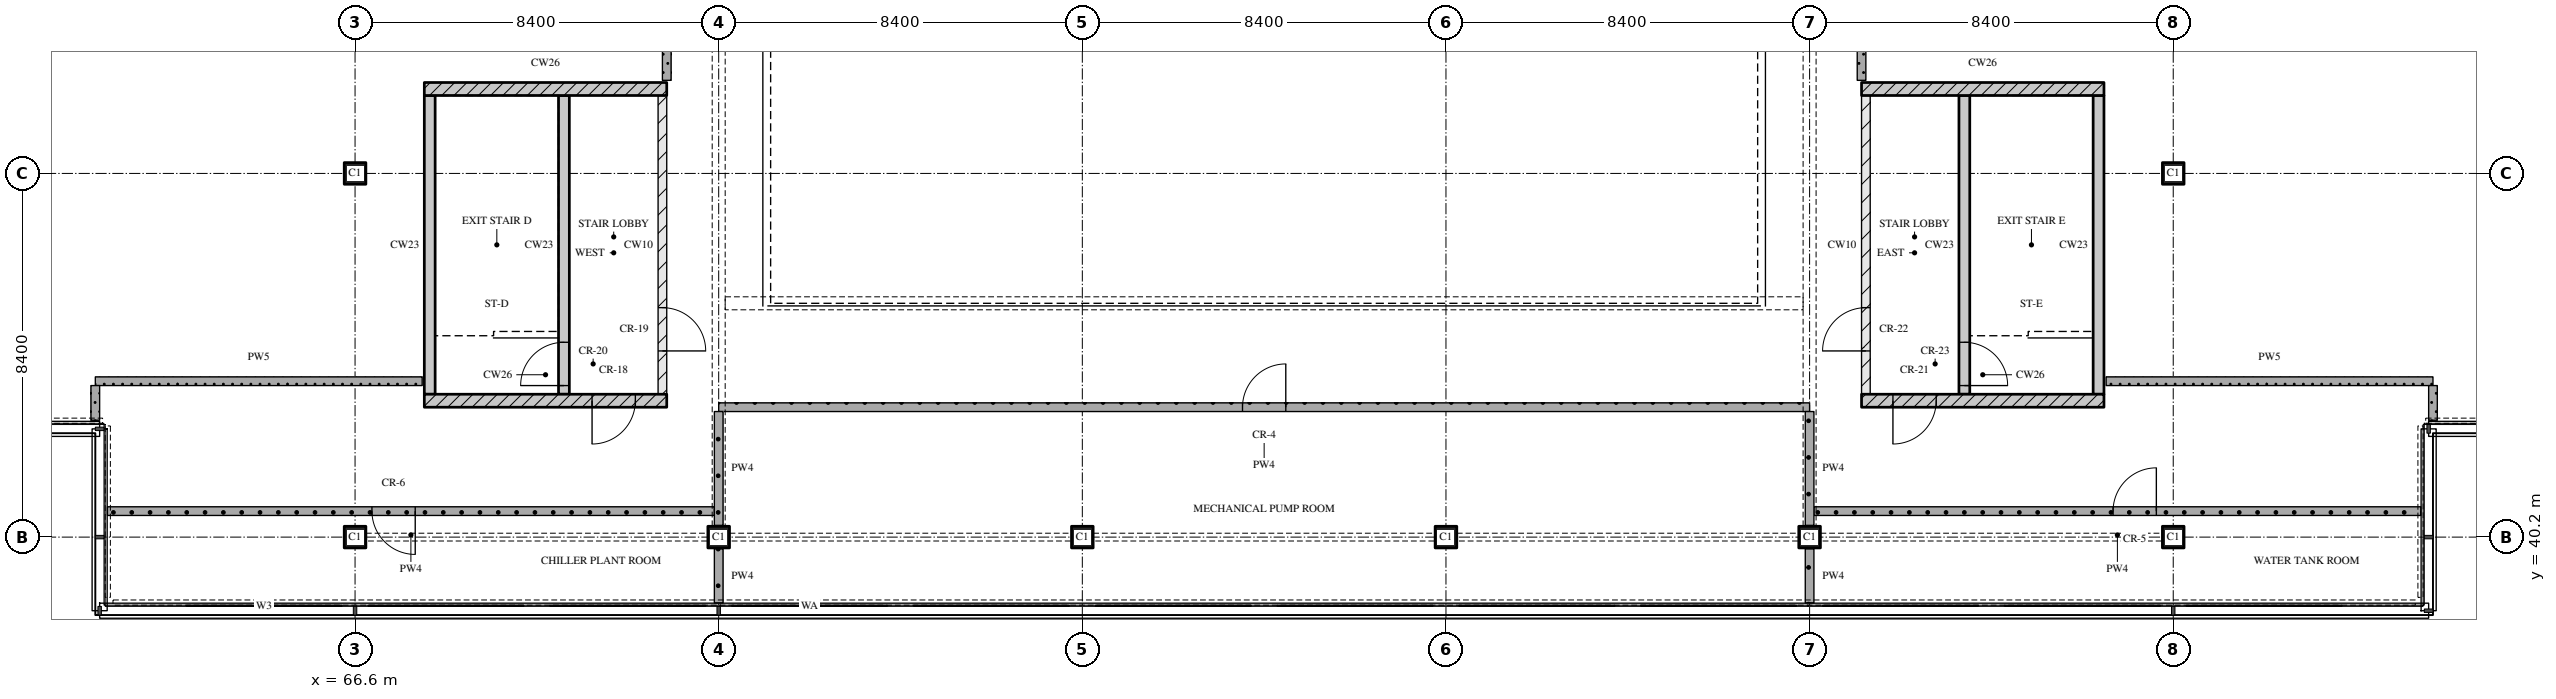
"""IFC4 building model, lengths in metres.
Left out: names, types, materials, properties, quantities, classifications, styles, units other than length and angle.
Written with IfcOpenShell. Run it as: python <this file> out.ifc"""

import sys

from ifc_helpers import new_model, si_unit, direction, frame, frame_2d, origin, origin_2d, place, context, subcontext, project, spatial, rectangle, extrude, element, fill, save


model = new_model("IFC4")
c1 = context("Model", 3, precision=1e-05, world=origin(), true_north=direction((0.0, 1.0)))
c2 = subcontext(c1, "Body", "Model", "MODEL_VIEW")
j1 = project(units=[si_unit("LENGTHUNIT", "METRE"), si_unit("PLANEANGLEUNIT", "RADIAN")], contexts=[c1])
p1 = place(None, origin())
s1 = spatial("IfcSite", under=j1, at=p1, CompositionType="ELEMENT")
p2 = place(p1, origin())
s2 = spatial("IfcBuilding", under=s1, at=p2, CompositionType="ELEMENT")
p3 = place(p2, frame((0.0, 0.0, 310.35)))
s3 = spatial("IfcBuildingStorey", under=s2, at=p3, CompositionType="ELEMENT", Elevation=310.35)
for number, where, z_axis, x_axis in (
    (1, (66.6, 40.2, 0.0), (0.0, 0.0, 1.0), (1.0, 0.0, 0.0)),
    (2, (66.6, 48.6, 0.0), (0.0, 0.0, 1.0), (1.0, 0.0, 0.0)),
    (3, (75.0, 40.2, 0.0), (0.0, 0.0, 1.0), (1.0, 0.0, 0.0)),
    (4, (83.4, 40.2, 0.0), (0.0, 0.0, 1.0), (1.0, 0.0, 0.0)),
    (5, (91.8, 40.2, 0.0), (0.0, 0.0, 1.0), (1.0, 0.0, 0.0)),
    (6, (100.2, 40.2, 0.0), (0.0, 0.0, 1.0), (1.0, 0.0, 0.0)),
    (7, (108.6, 40.2, 0.0), (0.0, 0.0, 1.0), (1.0, 0.0, 0.0)),
    (8, (108.6, 48.6, 0.0), (0.0, 0.0, 1.0), (1.0, 0.0, 0.0)),
):
    element("IfcColumn", number, at=place(p3, frame(where, z_axis=z_axis, x_axis=x_axis)), inside=s3, PredefinedType="COLUMN", context=c2, shape_type="SweptSolid", body=[
        extrude(rectangle(XDim=0.5, YDim=0.5, at=origin_2d()), origin(), (0.0, 0.0, 1.0), 4.5),
    ])
p4 = place(p3, frame((68.2, 43.35, 0.0), z_axis=(0.0, 0.0, 1.0), x_axis=(1.0, 0.0, 0.0)))
e9 = element("IfcWall", 9, at=p4, inside=s3, PredefinedType="SOLIDWALL", context=c2, shape_type="SweptSolid", body=[
    extrude(rectangle(XDim=5.6, YDim=0.3, at=frame_2d((2.8, 0.0))), origin(), (0.0, 0.0, 1.0), 4.2),
])
p5 = place(p4, frame((3.875, 0.0, 0.0)))
e10 = element("IfcOpeningElement", 10, at=p5, cuts=e9, PredefinedType="OPENING", context=c2, shape_type="SweptSolid", body=[
    extrude(rectangle(XDim=1.0, YDim=2.1, at=frame_2d((0.5, 1.05))), frame((0.0, 0.16, 0.0), z_axis=(0.0, -1.0, 0.0), x_axis=(1.0, 0.0, 0.0)), (0.0, 0.0, 1.0), 0.32),
])
p6 = place(p3, frame((68.325, 43.5, 0.0), z_axis=(0.0, 0.0, 1.0), x_axis=(0.0, 1.0, 0.0)))
e11 = element("IfcWall", 11, at=p6, inside=s3, PredefinedType="SOLIDWALL", context=c2, shape_type="SweptSolid", body=[
    extrude(rectangle(XDim=6.9, YDim=0.25, at=frame_2d((3.45, 0.0))), origin(), (0.0, 0.0, 1.0), 4.2),
])
p7 = place(p3, frame((71.425, 43.5, 0.0), z_axis=(0.0, 0.0, 1.0), x_axis=(0.0, 1.0, 0.0)))
e12 = element("IfcWall", 12, at=p7, inside=s3, PredefinedType="SOLIDWALL", context=c2, shape_type="SweptSolid", body=[
    extrude(rectangle(XDim=6.9, YDim=0.25, at=frame_2d((3.45, 0.0))), origin(), (0.0, 0.0, 1.0), 4.2),
])
p8 = place(p7, frame((0.2, 0.0, 0.0)))
e13 = element("IfcOpeningElement", 13, at=p8, cuts=e12, PredefinedType="OPENING", context=c2, shape_type="SweptSolid", body=[
    extrude(rectangle(XDim=1.0, YDim=2.1, at=frame_2d((0.5, 1.05))), frame((0.0, 0.135, 0.0), z_axis=(0.0, -1.0, 0.0), x_axis=(1.0, 0.0, 0.0)), (0.0, 0.0, 1.0), 0.27),
])
p9 = place(p3, frame((73.7, 43.5, 0.0), z_axis=(0.0, 0.0, 1.0), x_axis=(0.0, 1.0, 0.0)))
e14 = element("IfcWall", 14, at=p9, inside=s3, PredefinedType="PARTITIONING", context=c2, shape_type="SweptSolid", body=[
    extrude(rectangle(XDim=6.9, YDim=0.2, at=frame_2d((3.45, 0.0))), origin(), (0.0, 0.0, 1.0), 4.2),
])
p10 = place(p9, frame((1.0, 0.0, 0.0)))
e15 = element("IfcOpeningElement", 15, at=p10, cuts=e14, PredefinedType="OPENING", context=c2, shape_type="SweptSolid", body=[
    extrude(rectangle(XDim=1.0, YDim=2.1, at=frame_2d((0.5, 1.05))), frame((0.0, 0.11, 0.0), z_axis=(0.0, -1.0, 0.0), x_axis=(1.0, 0.0, 0.0)), (0.0, 0.0, 1.0), 0.22),
])
p11 = place(p3, frame((68.2, 50.55, 0.0), z_axis=(0.0, 0.0, 1.0), x_axis=(1.0, 0.0, 0.0)))
e16 = element("IfcWall", 16, at=p11, inside=s3, PredefinedType="SOLIDWALL", context=c2, shape_type="SweptSolid", body=[
    extrude(rectangle(XDim=5.6, YDim=0.3, at=frame_2d((2.8, 0.0))), origin(), (0.0, 0.0, 1.0), 4.2),
])
p12 = place(p3, frame((101.4, 43.35, 0.0), z_axis=(0.0, 0.0, 1.0), x_axis=(1.0, 0.0, 0.0)))
e17 = element("IfcWall", 17, at=p12, inside=s3, PredefinedType="SOLIDWALL", context=c2, shape_type="SweptSolid", body=[
    extrude(rectangle(XDim=5.6, YDim=0.3, at=frame_2d((2.8, 0.0))), origin(), (0.0, 0.0, 1.0), 4.2),
])
p13 = place(p12, frame((0.725, 0.0, 0.0)))
e18 = element("IfcOpeningElement", 18, at=p13, cuts=e17, PredefinedType="OPENING", context=c2, shape_type="SweptSolid", body=[
    extrude(rectangle(XDim=1.0, YDim=2.1, at=frame_2d((0.5, 1.05))), frame((0.0, 0.16, 0.0), z_axis=(0.0, -1.0, 0.0), x_axis=(1.0, 0.0, 0.0)), (0.0, 0.0, 1.0), 0.32),
])
p14 = place(p3, frame((101.5, 43.5, 0.0), z_axis=(0.0, 0.0, 1.0), x_axis=(0.0, 1.0, 0.0)))
e19 = element("IfcWall", 19, at=p14, inside=s3, PredefinedType="PARTITIONING", context=c2, shape_type="SweptSolid", body=[
    extrude(rectangle(XDim=6.9, YDim=0.2, at=frame_2d((3.45, 0.0))), origin(), (0.0, 0.0, 1.0), 4.2),
])
p15 = place(p14, frame((1.0, 0.0, 0.0)))
e20 = element("IfcOpeningElement", 20, at=p15, cuts=e19, PredefinedType="OPENING", context=c2, shape_type="SweptSolid", body=[
    extrude(rectangle(XDim=1.0, YDim=2.1, at=frame_2d((0.5, 1.05))), frame((0.0, 0.11, 0.0), z_axis=(0.0, -1.0, 0.0), x_axis=(1.0, 0.0, 0.0)), (0.0, 0.0, 1.0), 0.22),
])
p16 = place(p3, frame((103.775, 43.5, 0.0), z_axis=(0.0, 0.0, 1.0), x_axis=(0.0, 1.0, 0.0)))
e21 = element("IfcWall", 21, at=p16, inside=s3, PredefinedType="SOLIDWALL", context=c2, shape_type="SweptSolid", body=[
    extrude(rectangle(XDim=6.9, YDim=0.25, at=frame_2d((3.45, 0.0))), origin(), (0.0, 0.0, 1.0), 4.2),
])
p17 = place(p16, frame((0.2, 0.0, 0.0)))
e22 = element("IfcOpeningElement", 22, at=p17, cuts=e21, PredefinedType="OPENING", context=c2, shape_type="SweptSolid", body=[
    extrude(rectangle(XDim=1.0, YDim=2.1, at=frame_2d((0.5, 1.05))), frame((0.0, 0.135, 0.0), z_axis=(0.0, -1.0, 0.0), x_axis=(1.0, 0.0, 0.0)), (0.0, 0.0, 1.0), 0.27),
])
p18 = place(p3, frame((106.875, 43.5, 0.0), z_axis=(0.0, 0.0, 1.0), x_axis=(0.0, 1.0, 0.0)))
e23 = element("IfcWall", 23, at=p18, inside=s3, PredefinedType="SOLIDWALL", context=c2, shape_type="SweptSolid", body=[
    extrude(rectangle(XDim=6.9, YDim=0.25, at=frame_2d((3.45, 0.0))), origin(), (0.0, 0.0, 1.0), 4.2),
])
p19 = place(p3, frame((101.4, 50.55, 0.0), z_axis=(0.0, 0.0, 1.0), x_axis=(1.0, 0.0, 0.0)))
e24 = element("IfcWall", 24, at=p19, inside=s3, PredefinedType="SOLIDWALL", context=c2, shape_type="SweptSolid", body=[
    extrude(rectangle(XDim=5.6, YDim=0.3, at=frame_2d((2.8, 0.0))), origin(), (0.0, 0.0, 1.0), 4.2),
])
p20 = place(p3, frame((74.9, 40.8, 0.0), z_axis=(0.0, 0.0, 1.0), x_axis=(-1.0, 0.0, 0.0)))
e25 = element("IfcWall", 25, at=p20, inside=s3, PredefinedType="PARTITIONING", context=c2, shape_type="SweptSolid", body=[
    extrude(rectangle(XDim=14.02, YDim=0.2, at=frame_2d((7.01, 0.0))), origin(), (0.0, 0.0, 1.0), 4.2),
])
p21 = place(p20, frame((6.91, 0.0, 0.0)))
e26 = element("IfcOpeningElement", 26, at=p21, cuts=e25, PredefinedType="OPENING", context=c2, shape_type="SweptSolid", body=[
    extrude(rectangle(XDim=1.0, YDim=2.1, at=frame_2d((0.5, 1.05))), frame((0.0, 0.11, 0.0), z_axis=(0.0, -1.0, 0.0), x_axis=(1.0, 0.0, 0.0)), (0.0, 0.0, 1.0), 0.22),
])
p22 = place(p3, frame((114.32, 40.8, 0.0), z_axis=(0.0, 0.0, 1.0), x_axis=(-1.0, 0.0, 0.0)))
e27 = element("IfcWall", 27, at=p22, inside=s3, PredefinedType="PARTITIONING", context=c2, shape_type="SweptSolid", body=[
    extrude(rectangle(XDim=14.02, YDim=0.2, at=frame_2d((7.01, 0.0))), origin(), (0.0, 0.0, 1.0), 4.2),
])
p23 = place(p22, frame((6.11, 0.0, 0.0)))
e28 = element("IfcOpeningElement", 28, at=p23, cuts=e27, PredefinedType="OPENING", context=c2, shape_type="SweptSolid", body=[
    extrude(rectangle(XDim=1.0, YDim=2.1, at=frame_2d((0.5, 1.05))), frame((0.0, 0.11, 0.0), z_axis=(0.0, -1.0, 0.0), x_axis=(1.0, 0.0, 0.0)), (0.0, 0.0, 1.0), 0.22),
])
p24 = place(p3, frame((100.2, 43.2, 0.0), z_axis=(0.0, 0.0, 1.0), x_axis=(-1.0, 0.0, 0.0)))
e29 = element("IfcWall", 29, at=p24, inside=s3, PredefinedType="PARTITIONING", context=c2, shape_type="SweptSolid", body=[
    extrude(rectangle(XDim=25.2, YDim=0.2, at=frame_2d((12.6, 0.0))), origin(), (0.0, 0.0, 1.0), 4.2),
])
p25 = place(p24, frame((12.1, 0.0, 0.0)))
e30 = element("IfcOpeningElement", 30, at=p25, cuts=e29, PredefinedType="OPENING", context=c2, shape_type="SweptSolid", body=[
    extrude(rectangle(XDim=1.0, YDim=2.1, at=frame_2d((0.5, 1.05))), frame((0.0, 0.11, 0.0), z_axis=(0.0, -1.0, 0.0), x_axis=(1.0, 0.0, 0.0)), (0.0, 0.0, 1.0), 0.22),
])
p26 = place(p3, frame((60.6, 43.8, 0.0), z_axis=(0.0, 0.0, 1.0), x_axis=(1.0, 0.0, 0.0)))
e31 = element("IfcWall", 31, at=p26, inside=s3, PredefinedType="PARTITIONING", context=c2, shape_type="SweptSolid", body=[
    extrude(rectangle(XDim=7.55, YDim=0.2, at=frame_2d((3.775, 0.0))), origin(), (0.0, 0.0, 1.0), 4.2),
])
p27 = place(p3, frame((107.05, 43.8, 0.0), z_axis=(0.0, 0.0, 1.0), x_axis=(1.0, 0.0, 0.0)))
e32 = element("IfcWall", 32, at=p27, inside=s3, PredefinedType="PARTITIONING", context=c2, shape_type="SweptSolid", body=[
    extrude(rectangle(XDim=7.55, YDim=0.2, at=frame_2d((3.775, 0.0))), origin(), (0.0, 0.0, 1.0), 4.2),
])
p28 = place(p3, frame((60.6, 43.7, 0.0), z_axis=(0.0, 0.0, 1.0), x_axis=(0.0, -1.0, 0.0)))
e33 = element("IfcWall", 33, at=p28, inside=s3, PredefinedType="PARTITIONING", context=c2, shape_type="SweptSolid", body=[
    extrude(rectangle(XDim=0.8, YDim=0.2, at=frame_2d((0.4, 0.0))), origin(), (0.0, 0.0, 1.0), 4.2),
])
p29 = place(p3, frame((73.8, 52.4, 0.0), z_axis=(0.0, 0.0, 1.0), x_axis=(0.0, -1.0, 0.0)))
e34 = element("IfcWall", 34, at=p29, inside=s3, PredefinedType="PARTITIONING", context=c2, shape_type="SweptSolid", body=[
    extrude(rectangle(XDim=1.65, YDim=0.2, at=frame_2d((0.825, 0.0))), origin(), (0.0, 0.0, 1.0), 4.2),
])
p30 = place(p3, frame((75.0, 39.93, 0.0), z_axis=(0.0, 0.0, 1.0), x_axis=(0.0, -1.0, 0.0)))
e35 = element("IfcWall", 35, at=p30, inside=s3, PredefinedType="PARTITIONING", context=c2, shape_type="SweptSolid", body=[
    extrude(rectangle(XDim=1.25, YDim=0.2, at=frame_2d((0.625, 0.0))), origin(), (0.0, 0.0, 1.0), 4.2),
])
p31 = place(p3, frame((75.0, 43.1, 0.0), z_axis=(0.0, 0.0, 1.0), x_axis=(0.0, -1.0, 0.0)))
e36 = element("IfcWall", 36, at=p31, inside=s3, PredefinedType="PARTITIONING", context=c2, shape_type="SweptSolid", body=[
    extrude(rectangle(XDim=2.63, YDim=0.2, at=frame_2d((1.315, 0.0))), origin(), (0.0, 0.0, 1.0), 3.41),
])
p32 = place(p3, frame((100.2, 39.93, 0.0), z_axis=(0.0, 0.0, 1.0), x_axis=(0.0, -1.0, 0.0)))
e37 = element("IfcWall", 37, at=p32, inside=s3, PredefinedType="PARTITIONING", context=c2, shape_type="SweptSolid", body=[
    extrude(rectangle(XDim=1.25, YDim=0.2, at=frame_2d((0.625, 0.0))), origin(), (0.0, 0.0, 1.0), 4.2),
])
p33 = place(p3, frame((100.2, 43.1, 0.0), z_axis=(0.0, 0.0, 1.0), x_axis=(0.0, -1.0, 0.0)))
e38 = element("IfcWall", 38, at=p33, inside=s3, PredefinedType="PARTITIONING", context=c2, shape_type="SweptSolid", body=[
    extrude(rectangle(XDim=2.63, YDim=0.2, at=frame_2d((1.315, 0.0))), origin(), (0.0, 0.0, 1.0), 3.41),
])
p34 = place(p3, frame((101.4, 52.4, 0.0), z_axis=(0.0, 0.0, 1.0), x_axis=(0.0, -1.0, 0.0)))
e39 = element("IfcWall", 39, at=p34, inside=s3, PredefinedType="PARTITIONING", context=c2, shape_type="SweptSolid", body=[
    extrude(rectangle(XDim=1.65, YDim=0.2, at=frame_2d((0.825, 0.0))), origin(), (0.0, 0.0, 1.0), 4.2),
])
p35 = place(p3, frame((114.6, 43.7, 0.0), z_axis=(0.0, 0.0, 1.0), x_axis=(0.0, -1.0, 0.0)))
e40 = element("IfcWall", 40, at=p35, inside=s3, PredefinedType="PARTITIONING", context=c2, shape_type="SweptSolid", body=[
    extrude(rectangle(XDim=0.8, YDim=0.2, at=frame_2d((0.4, 0.0))), origin(), (0.0, 0.0, 1.0), 4.2),
])
p36 = place(p5, origin())
e41 = element("IfcDoor", 41, at=p36, inside=s3, OperationType="SINGLE_SWING_RIGHT", PredefinedType="DOOR", context=c2, shape_type="SweptSolid", body=[
    extrude(rectangle(XDim=1.0, YDim=2.1, at=frame_2d((0.5, 1.05))), frame((0.0, 0.025, 0.0), z_axis=(0.0, -1.0, 0.0), x_axis=(1.0, 0.0, 0.0)), (0.0, 0.0, 1.0), 0.05),
])
fill(e10, e41)
p37 = place(p8, origin())
e42 = element("IfcDoor", 42, at=p37, inside=s3, OperationType="SINGLE_SWING_LEFT", PredefinedType="DOOR", context=c2, shape_type="SweptSolid", body=[
    extrude(rectangle(XDim=1.0, YDim=2.1, at=frame_2d((0.5, 1.05))), frame((0.0, 0.025, 0.0), z_axis=(0.0, -1.0, 0.0), x_axis=(1.0, 0.0, 0.0)), (0.0, 0.0, 1.0), 0.05),
])
fill(e13, e42)
p38 = place(p10, origin())
e43 = element("IfcDoor", 43, at=p38, inside=s3, OperationType="SINGLE_SWING_RIGHT", PredefinedType="DOOR", context=c2, shape_type="SweptSolid", body=[
    extrude(rectangle(XDim=1.0, YDim=2.1, at=frame_2d((0.5, 1.05))), frame((0.0, 0.025, 0.0), z_axis=(0.0, -1.0, 0.0), x_axis=(1.0, 0.0, 0.0)), (0.0, 0.0, 1.0), 0.05),
])
fill(e15, e43)
p39 = place(p13, origin())
e44 = element("IfcDoor", 44, at=p39, inside=s3, OperationType="SINGLE_SWING_RIGHT", PredefinedType="DOOR", context=c2, shape_type="SweptSolid", body=[
    extrude(rectangle(XDim=1.0, YDim=2.1, at=frame_2d((0.5, 1.05))), frame((0.0, 0.025, 0.0), z_axis=(0.0, -1.0, 0.0), x_axis=(1.0, 0.0, 0.0)), (0.0, 0.0, 1.0), 0.05),
])
fill(e18, e44)
p40 = place(p17, origin())
e45 = element("IfcDoor", 45, at=p40, inside=s3, OperationType="SINGLE_SWING_RIGHT", PredefinedType="DOOR", context=c2, shape_type="SweptSolid", body=[
    extrude(rectangle(XDim=1.0, YDim=2.1, at=frame_2d((0.5, 1.05))), frame((0.0, 0.025, 0.0), z_axis=(0.0, -1.0, 0.0), x_axis=(1.0, 0.0, 0.0)), (0.0, 0.0, 1.0), 0.05),
])
fill(e22, e45)
p41 = place(p15, origin())
e46 = element("IfcDoor", 46, at=p41, inside=s3, OperationType="SINGLE_SWING_LEFT", PredefinedType="DOOR", context=c2, shape_type="SweptSolid", body=[
    extrude(rectangle(XDim=1.0, YDim=2.1, at=frame_2d((0.5, 1.05))), frame((0.0, 0.025, 0.0), z_axis=(0.0, -1.0, 0.0), x_axis=(1.0, 0.0, 0.0)), (0.0, 0.0, 1.0), 0.05),
])
fill(e20, e46)
p42 = place(p21, origin())
e47 = element("IfcDoor", 47, at=p42, inside=s3, OperationType="SINGLE_SWING_LEFT", PredefinedType="DOOR", context=c2, shape_type="SweptSolid", body=[
    extrude(rectangle(XDim=1.0, YDim=2.1, at=frame_2d((0.5, 1.05))), frame((0.0, 0.025, 0.0), z_axis=(0.0, -1.0, 0.0), x_axis=(1.0, 0.0, 0.0)), (0.0, 0.0, 1.0), 0.05),
])
fill(e26, e47)
p43 = place(p23, origin())
e48 = element("IfcDoor", 48, at=p43, inside=s3, OperationType="SINGLE_SWING_RIGHT", PredefinedType="DOOR", context=c2, shape_type="SweptSolid", body=[
    extrude(rectangle(XDim=1.0, YDim=2.1, at=frame_2d((0.5, 1.05))), frame((0.0, 0.025, 0.0), z_axis=(0.0, -1.0, 0.0), x_axis=(1.0, 0.0, 0.0)), (0.0, 0.0, 1.0), 0.05),
])
fill(e28, e48)
p44 = place(p25, origin())
e49 = element("IfcDoor", 49, at=p44, inside=s3, OperationType="SINGLE_SWING_RIGHT", PredefinedType="DOOR", context=c2, shape_type="SweptSolid", body=[
    extrude(rectangle(XDim=1.0, YDim=2.1, at=frame_2d((0.5, 1.05))), frame((0.0, 0.025, 0.0), z_axis=(0.0, -1.0, 0.0), x_axis=(1.0, 0.0, 0.0)), (0.0, 0.0, 1.0), 0.05),
])
fill(e30, e49)
save(model, sys.argv[1])
